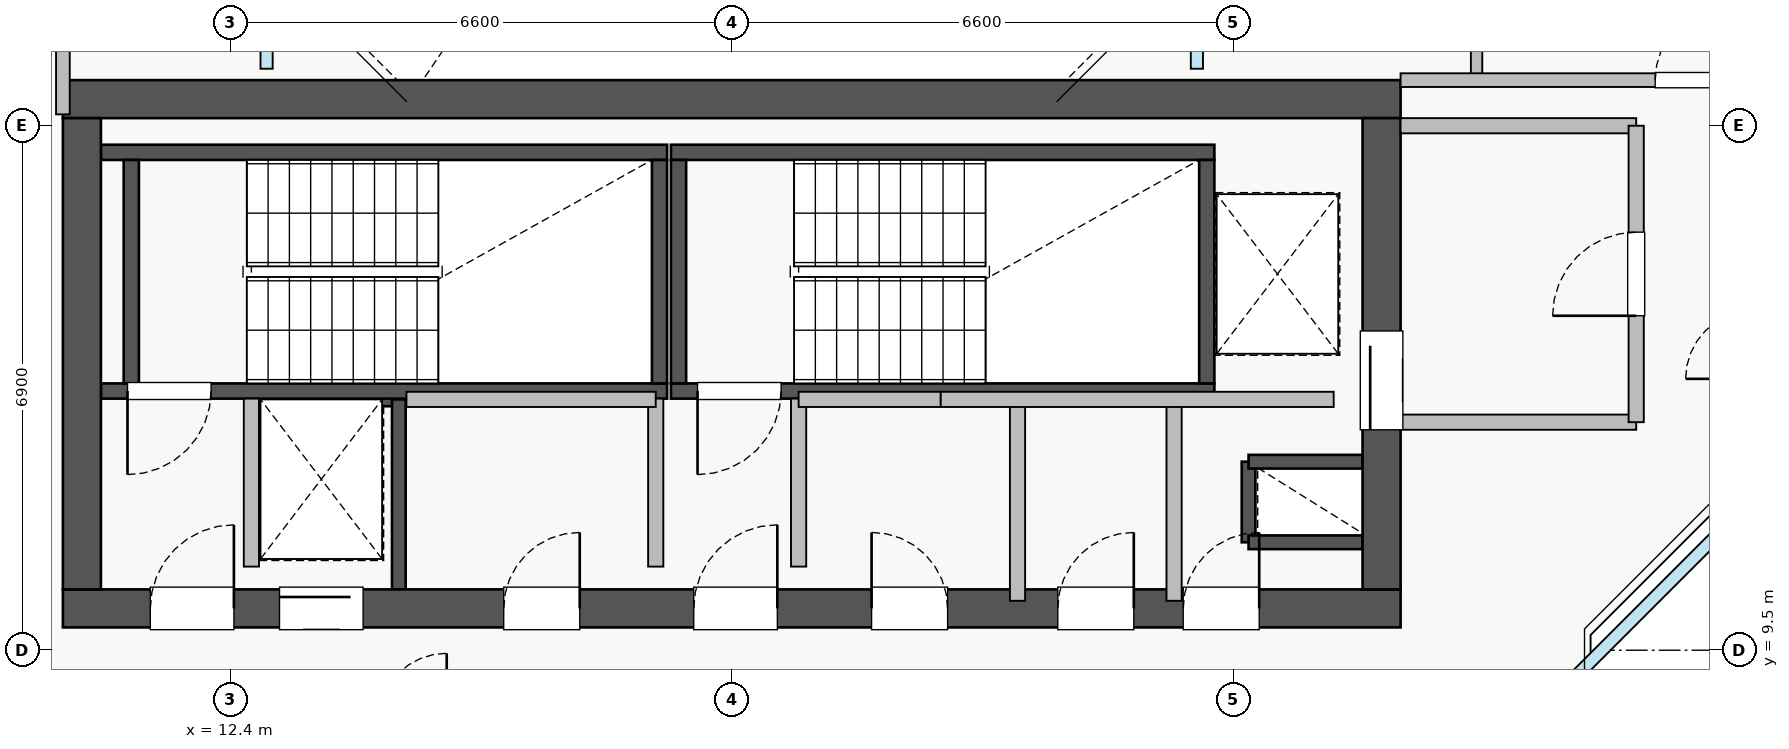
"""IFC4 building model, lengths in metres.
Left out: names, types, materials, properties, quantities, classifications, styles, units other than length and angle.
Written with IfcOpenShell. Run it as: python <this file> out.ifc"""

import sys

from ifc_helpers import new_model, si_unit, direction, frame, frame_2d, origin, place, context, subcontext, project, spatial, rectangle, extrude, source, transform, mapped, element, fill, save


model = new_model("IFC4")
c1 = context("Model", 3, precision=1e-05, world=origin(), true_north=direction((0.0, 1.0)))
c2 = subcontext(c1, "Body", "Model", "MODEL_VIEW")
j1 = project(units=[si_unit("LENGTHUNIT", "METRE"), si_unit("PLANEANGLEUNIT", "RADIAN")], contexts=[c1])
p1 = place(None, origin())
s1 = spatial("IfcSite", under=j1, at=p1, CompositionType="ELEMENT")
p2 = place(p1, origin())
s2 = spatial("IfcBuilding", under=s1, at=p2, CompositionType="ELEMENT")
p3 = place(p2, frame((0.0, 0.0, 240.5)))
s3 = spatial("IfcBuildingStorey", under=s2, at=p3, CompositionType="ELEMENT", Elevation=240.5)
p4 = place(p3, frame((12.68, 12.8, 0.0), z_axis=(0.0, 0.0, 1.0), x_axis=(1.0, 0.0, 0.0)))
e1 = element("IfcWall", 1, at=p4, inside=s3, PredefinedType="SHEAR", context=c2, shape_type="SweptSolid", body=[
    extrude(rectangle(XDim=1.94, YDim=0.18, at=frame_2d((0.97, 0.0))), origin(), (0.0, 0.0, 1.0), 3.07),
])
p5 = place(p3, frame((14.62, 10.3, 0.0), z_axis=(0.0, 0.0, 1.0), x_axis=(0.0, 1.0, 0.0)))
e2 = element("IfcWall", 2, at=p5, inside=s3, PredefinedType="SHEAR", context=c2, shape_type="SweptSolid", body=[
    extrude(rectangle(XDim=2.5, YDim=0.18, at=frame_2d((1.25, 0.0))), origin(), (0.0, 0.0, 1.0), 3.07),
])
p6 = place(p3, frame((25.8, 10.92, 0.0), z_axis=(0.0, 0.0, 1.0), x_axis=(0.0, 1.0, 0.0)))
e3 = element("IfcWall", 3, at=p6, inside=s3, PredefinedType="SHEAR", context=c2, shape_type="SweptSolid", body=[
    extrude(rectangle(XDim=1.06, YDim=0.18, at=frame_2d((0.53, 0.0))), origin(), (0.0, 0.0, 1.0), 3.07),
])
for number, where, z_axis, x_axis in (
    (4, (25.8, 11.98, 0.0), (0.0, 0.0, 1.0), (1.0, 0.0, 0.0)),
    (5, (25.8, 10.92, 0.0), (0.0, 0.0, 1.0), (1.0, 0.0, 0.0)),
):
    element("IfcWall", number, at=place(p3, frame(where, z_axis=z_axis, x_axis=x_axis)), inside=s3, PredefinedType="SHEAR", context=c2, shape_type="SweptSolid", body=[
        extrude(rectangle(XDim=1.5, YDim=0.18, at=frame_2d((0.75, 0.0))), origin(), (0.0, 0.0, 1.0), 3.07),
    ])
p7 = place(p3, frame((10.7, 12.91, 0.0), z_axis=(0.0, 0.0, 1.0), x_axis=(1.0, 0.0, 0.0)))
e6 = element("IfcWall", 6, at=p7, inside=s3, PredefinedType="SHEAR", context=c2, shape_type="SweptSolid", body=[
    extrude(rectangle(XDim=7.45, YDim=0.2, at=frame_2d((3.725, 0.0))), origin(), (0.0, 0.0, 1.0), 3.25),
])
p8 = place(p7, frame((0.35, 0.0, 0.0)))
e7 = element("IfcOpeningElement", 7, at=p8, cuts=e6, PredefinedType="OPENING", context=c2, shape_type="SweptSolid", body=[
    extrude(rectangle(XDim=1.1, YDim=2.05, at=frame_2d((0.55, 1.025))), frame((0.0, 0.11, 0.0), z_axis=(0.0, -1.0, 0.0), x_axis=(1.0, 0.0, 0.0)), (0.0, 0.0, 1.0), 0.22),
])
p9 = place(p3, frame((10.7, 16.05, 0.0), z_axis=(0.0, 0.0, 1.0), x_axis=(1.0, 0.0, 0.0)))
e8 = element("IfcWall", 8, at=p9, inside=s3, PredefinedType="SHEAR", context=c2, shape_type="SweptSolid", body=[
    extrude(rectangle(XDim=7.45, YDim=0.2, at=frame_2d((3.725, 0.0))), origin(), (0.0, 0.0, 1.0), 3.25),
])
for number, where, z_axis, x_axis in (
    (9, (11.1, 13.01, 0.0), (0.0, 0.0, 1.0), (0.0, 1.0, 0.0)),
    (10, (18.05, 13.01, 0.0), (0.0, 0.0, 1.0), (0.0, 1.0, 0.0)),
):
    element("IfcWall", number, at=place(p3, frame(where, z_axis=z_axis, x_axis=x_axis)), inside=s3, PredefinedType="SHEAR", context=c2, shape_type="SweptSolid", body=[
        extrude(rectangle(XDim=2.94, YDim=0.2, at=frame_2d((1.47, 0.0))), origin(), (0.0, 0.0, 1.0), 3.25),
    ])
p10 = place(p3, frame((18.2, 12.91, 0.0), z_axis=(0.0, 0.0, 1.0), x_axis=(1.0, 0.0, 0.0)))
e11 = element("IfcWall", 11, at=p10, inside=s3, PredefinedType="SHEAR", context=c2, shape_type="SweptSolid", body=[
    extrude(rectangle(XDim=7.15, YDim=0.2, at=frame_2d((3.575, 0.0))), origin(), (0.0, 0.0, 1.0), 3.25),
])
p11 = place(p10, frame((0.35, 0.0, 0.0)))
e12 = element("IfcOpeningElement", 12, at=p11, cuts=e11, PredefinedType="OPENING", context=c2, shape_type="SweptSolid", body=[
    extrude(rectangle(XDim=1.1, YDim=2.05, at=frame_2d((0.55, 1.025))), frame((0.0, 0.11, 0.0), z_axis=(0.0, -1.0, 0.0), x_axis=(1.0, 0.0, 0.0)), (0.0, 0.0, 1.0), 0.22),
])
p12 = place(p3, frame((18.2, 16.05, 0.0), z_axis=(0.0, 0.0, 1.0), x_axis=(1.0, 0.0, 0.0)))
e13 = element("IfcWall", 13, at=p12, inside=s3, PredefinedType="SHEAR", context=c2, shape_type="SweptSolid", body=[
    extrude(rectangle(XDim=7.15, YDim=0.2, at=frame_2d((3.575, 0.0))), origin(), (0.0, 0.0, 1.0), 3.25),
])
for number, where, z_axis, x_axis in (
    (14, (18.3, 13.01, 0.0), (0.0, 0.0, 1.0), (0.0, 1.0, 0.0)),
    (15, (25.25, 13.01, 0.0), (0.0, 0.0, 1.0), (0.0, 1.0, 0.0)),
):
    element("IfcWall", number, at=place(p3, frame(where, z_axis=z_axis, x_axis=x_axis)), inside=s3, PredefinedType="SHEAR", context=c2, shape_type="SweptSolid", body=[
        extrude(rectangle(XDim=2.94, YDim=0.2, at=frame_2d((1.47, 0.0))), origin(), (0.0, 0.0, 1.0), 3.25),
    ])
p13 = place(p3, frame((10.2, 10.05, 0.0), z_axis=(0.0, 0.0, 1.0), x_axis=(1.0, 0.0, 0.0)))
e16 = element("IfcWall", 16, at=p13, inside=s3, PredefinedType="SHEAR", context=c2, shape_type="SweptSolid", body=[
    extrude(rectangle(XDim=17.6, YDim=0.5, at=frame_2d((8.8, 0.0))), origin(), (0.0, 0.0, 1.0), 3.25),
])
p14 = place(p13, frame((1.15, 0.0, 0.0)))
e17 = element("IfcOpeningElement", 17, at=p14, cuts=e16, PredefinedType="OPENING", context=c2, shape_type="SweptSolid", body=[
    extrude(rectangle(XDim=1.1, YDim=2.05, at=frame_2d((0.55, 1.025))), frame((0.0, 0.26, 0.0), z_axis=(0.0, -1.0, 0.0), x_axis=(1.0, 0.0, 0.0)), (0.0, 0.0, 1.0), 0.52),
])
p15 = place(p13, frame((8.3, 0.0, 0.0)))
e18 = element("IfcOpeningElement", 18, at=p15, cuts=e16, PredefinedType="OPENING", context=c2, shape_type="SweptSolid", body=[
    extrude(rectangle(XDim=1.1, YDim=2.05, at=frame_2d((0.55, 1.025))), frame((0.0, 0.26, 0.0), z_axis=(0.0, -1.0, 0.0), x_axis=(1.0, 0.0, 0.0)), (0.0, 0.0, 1.0), 0.52),
])
p16 = place(p13, frame((2.85, 0.0, 0.0)))
e19 = element("IfcOpeningElement", 19, at=p16, cuts=e16, PredefinedType="OPENING", context=c2, shape_type="SweptSolid", body=[
    extrude(rectangle(XDim=1.1, YDim=2.05, at=frame_2d((0.55, 1.025))), frame((0.0, 0.26, 0.0), z_axis=(0.0, -1.0, 0.0), x_axis=(1.0, 0.0, 0.0)), (0.0, 0.0, 1.0), 0.52),
])
p17 = place(p13, frame((5.8, 0.0, 0.0)))
e20 = element("IfcOpeningElement", 20, at=p17, cuts=e16, PredefinedType="OPENING", context=c2, shape_type="SweptSolid", body=[
    extrude(rectangle(XDim=1.0, YDim=2.05, at=frame_2d((0.5, 1.025))), frame((0.0, 0.26, 0.0), z_axis=(0.0, -1.0, 0.0), x_axis=(1.0, 0.0, 0.0)), (0.0, 0.0, 1.0), 0.52),
])
p18 = place(p13, frame((14.74, 0.0, 0.0)))
e21 = element("IfcOpeningElement", 21, at=p18, cuts=e16, PredefinedType="OPENING", context=c2, shape_type="SweptSolid", body=[
    extrude(rectangle(XDim=1.0, YDim=2.05, at=frame_2d((0.5, 1.025))), frame((0.0, 0.26, 0.0), z_axis=(0.0, -1.0, 0.0), x_axis=(1.0, 0.0, 0.0)), (0.0, 0.0, 1.0), 0.52),
])
p19 = place(p13, frame((10.64, 0.0, 0.0)))
e22 = element("IfcOpeningElement", 22, at=p19, cuts=e16, PredefinedType="OPENING", context=c2, shape_type="SweptSolid", body=[
    extrude(rectangle(XDim=1.0, YDim=2.05, at=frame_2d((0.5, 1.025))), frame((0.0, 0.26, 0.0), z_axis=(0.0, -1.0, 0.0), x_axis=(1.0, 0.0, 0.0)), (0.0, 0.0, 1.0), 0.52),
])
p20 = place(p13, frame((13.09, 0.0, 0.0)))
e23 = element("IfcOpeningElement", 23, at=p20, cuts=e16, PredefinedType="OPENING", context=c2, shape_type="SweptSolid", body=[
    extrude(rectangle(XDim=1.0, YDim=2.05, at=frame_2d((0.5, 1.025))), frame((0.0, 0.26, 0.0), z_axis=(0.0, -1.0, 0.0), x_axis=(1.0, 0.0, 0.0)), (0.0, 0.0, 1.0), 0.52),
])
p21 = place(p3, frame((10.2, 16.75, 0.0), z_axis=(0.0, 0.0, 1.0), x_axis=(1.0, 0.0, 0.0)))
e24 = element("IfcWall", 24, at=p21, inside=s3, PredefinedType="SHEAR", context=c2, shape_type="SweptSolid", body=[
    extrude(rectangle(XDim=17.6, YDim=0.5, at=frame_2d((8.8, 0.0))), origin(), (0.0, 0.0, 1.0), 3.25),
])
p22 = place(p3, frame((10.45, 10.3, 0.0), z_axis=(0.0, 0.0, 1.0), x_axis=(0.0, 1.0, 0.0)))
e25 = element("IfcWall", 25, at=p22, inside=s3, PredefinedType="SHEAR", context=c2, shape_type="SweptSolid", body=[
    extrude(rectangle(XDim=6.2, YDim=0.5, at=frame_2d((3.1, 0.0))), origin(), (0.0, 0.0, 1.0), 3.25),
])
p23 = place(p3, frame((27.55, 10.3, 0.0), z_axis=(0.0, 0.0, 1.0), x_axis=(0.0, 1.0, 0.0)))
e26 = element("IfcWall", 26, at=p23, inside=s3, PredefinedType="SHEAR", context=c2, shape_type="SweptSolid", body=[
    extrude(rectangle(XDim=6.2, YDim=0.5, at=frame_2d((3.1, 0.0))), origin(), (0.0, 0.0, 1.0), 3.25),
])
p24 = place(p23, frame((2.1, 0.0, 0.0)))
e27 = element("IfcOpeningElement", 27, at=p24, cuts=e26, PredefinedType="OPENING", context=c2, shape_type="SweptSolid", body=[
    extrude(rectangle(XDim=1.3, YDim=2.05, at=frame_2d((0.65, 1.025))), frame((0.0, 0.26, 0.0), z_axis=(0.0, -1.0, 0.0), x_axis=(1.0, 0.0, 0.0)), (0.0, 0.0, 1.0), 0.52),
])
for number, where, z_axis, x_axis in (
    (28, (27.8, 16.4, 0.0), (0.0, 0.0, 1.0), (1.0, 0.0, 0.0)),
    (29, (27.8, 12.5, 0.0), (0.0, 0.0, 1.0), (1.0, 0.0, 0.0)),
):
    element("IfcWall", number, at=place(p3, frame(where, z_axis=z_axis, x_axis=x_axis)), inside=s3, PredefinedType="PARTITIONING", context=c2, shape_type="SweptSolid", body=[
        extrude(rectangle(XDim=3.1, YDim=0.2, at=frame_2d((1.55, 0.0))), origin(), (0.0, 0.0, 1.0), 3.07),
    ])
p25 = place(p3, frame((30.9, 12.5, 0.0), z_axis=(0.0, 0.0, 1.0), x_axis=(0.0, 1.0, 0.0)))
e30 = element("IfcWall", 30, at=p25, inside=s3, PredefinedType="PARTITIONING", context=c2, shape_type="SweptSolid", body=[
    extrude(rectangle(XDim=3.9, YDim=0.2, at=frame_2d((1.95, 0.0))), origin(), (0.0, 0.0, 1.0), 2.821),
])
p26 = place(p25, frame((1.4, 0.0, 0.0)))
e31 = element("IfcOpeningElement", 31, at=p26, cuts=e30, PredefinedType="OPENING", context=c2, shape_type="SweptSolid", body=[
    extrude(rectangle(XDim=1.1, YDim=2.05, at=frame_2d((0.55, 1.025))), frame((0.0, 0.11, 0.0), z_axis=(0.0, -1.0, 0.0), x_axis=(1.0, 0.0, 0.0)), (0.0, 0.0, 1.0), 0.22),
])
for number, where, z_axis, x_axis in (
    (32, (12.68, 10.6, 0.0), (0.0, 0.0, 1.0), (0.0, 1.0, 0.0)),
    (33, (18.0, 10.6, 0.0), (0.0, 0.0, 1.0), (0.0, 1.0, 0.0)),
    (34, (19.88, 10.6, 0.0), (0.0, 0.0, 1.0), (0.0, 1.0, 0.0)),
):
    element("IfcWall", number, at=place(p3, frame(where, z_axis=z_axis, x_axis=x_axis)), inside=s3, PredefinedType="PARTITIONING", context=c2, shape_type="SweptSolid", body=[
        extrude(rectangle(XDim=2.21, YDim=0.2, at=frame_2d((1.105, 0.0))), origin(), (0.0, 0.0, 1.0), 3.07),
    ])
p27 = place(p3, frame((14.72, 12.8, 0.0), z_axis=(0.0, 0.0, 1.0), x_axis=(1.0, 0.0, 0.0)))
e35 = element("IfcWall", 35, at=p27, inside=s3, PredefinedType="PARTITIONING", context=c2, shape_type="SweptSolid", body=[
    extrude(rectangle(XDim=3.28, YDim=0.2, at=frame_2d((1.64, 0.0))), origin(), (0.0, 0.0, 1.0), 3.07),
])
p28 = place(p3, frame((24.82, 10.15, 0.0), z_axis=(0.0, 0.0, 1.0), x_axis=(0.0, 1.0, 0.0)))
e36 = element("IfcWall", 36, at=p28, inside=s3, PredefinedType="PARTITIONING", context=c2, shape_type="SweptSolid", body=[
    extrude(rectangle(XDim=2.65, YDim=0.2, at=frame_2d((1.325, 0.0))), origin(), (0.0, 0.0, 1.0), 3.07),
])
p29 = place(p3, frame((19.88, 12.8, 0.0), z_axis=(0.0, 0.0, 1.0), x_axis=(1.0, 0.0, 0.0)))
e37 = element("IfcWall", 37, at=p29, inside=s3, PredefinedType="PARTITIONING", context=c2, shape_type="SweptSolid", body=[
    extrude(rectangle(XDim=1.87, YDim=0.2, at=frame_2d((0.935, 0.0))), origin(), (0.0, 0.0, 1.0), 3.07),
])
p30 = place(p3, frame((22.76, 10.15, 0.0), z_axis=(0.0, 0.0, 1.0), x_axis=(0.0, 1.0, 0.0)))
e38 = element("IfcWall", 38, at=p30, inside=s3, PredefinedType="PARTITIONING", context=c2, shape_type="SweptSolid", body=[
    extrude(rectangle(XDim=2.65, YDim=0.2, at=frame_2d((1.325, 0.0))), origin(), (0.0, 0.0, 1.0), 3.07),
])
p31 = place(p3, frame((21.75, 12.8, 0.0), z_axis=(0.0, 0.0, 1.0), x_axis=(1.0, 0.0, 0.0)))
e39 = element("IfcWall", 39, at=p31, inside=s3, PredefinedType="PARTITIONING", context=c2, shape_type="SweptSolid", body=[
    extrude(rectangle(XDim=5.17, YDim=0.2, at=frame_2d((2.585, 0.0))), origin(), (0.0, 0.0, 1.0), 3.07),
])
p32 = place(p3, frame((10.2, 16.55, 0.0), z_axis=(0.0, 0.0, 1.0), x_axis=(0.0, 1.0, 0.0)))
e40 = element("IfcWall", 40, at=p32, inside=s3, PredefinedType="PARTITIONING", context=c2, shape_type="SweptSolid", body=[
    extrude(rectangle(XDim=12.9, YDim=0.18, at=frame_2d((6.45, 0.0))), origin(), (0.0, 0.0, 1.0), 3.07),
])
p33 = place(p32, frame((2.025, 0.0, 0.0)))
e41 = element("IfcOpeningElement", 41, at=p33, cuts=e40, PredefinedType="OPENING", context=c2, shape_type="SweptSolid", body=[
    extrude(rectangle(XDim=0.85, YDim=2.05, at=frame_2d((0.425, 1.025))), frame((0.0, 0.1, 0.0), z_axis=(0.0, -1.0, 0.0), x_axis=(1.0, 0.0, 0.0)), (0.0, 0.0, 1.0), 0.2),
])
p34 = place(p32, frame((8.0, 0.0, 0.0)))
e42 = element("IfcOpeningElement", 42, at=p34, cuts=e40, PredefinedType="OPENING", context=c2, shape_type="SweptSolid", body=[
    extrude(rectangle(XDim=0.9, YDim=2.05, at=frame_2d((0.45, 1.025))), frame((0.0, 0.1, 0.0), z_axis=(0.0, -1.0, 0.0), x_axis=(1.0, 0.0, 0.0)), (0.0, 0.0, 1.0), 0.2),
])
p35 = place(p3, frame((28.8, 17.0, 0.0), z_axis=(0.0, 0.0, 1.0), x_axis=(0.0, 1.0, 0.0)))
e43 = element("IfcWall", 43, at=p35, inside=s3, PredefinedType="PARTITIONING", context=c2, shape_type="SweptSolid", body=[
    extrude(rectangle(XDim=6.0, YDim=0.15, at=frame_2d((3.0, 0.0))), origin(), (0.0, 0.0, 1.0), 3.07),
])
p36 = place(p35, frame((2.2, 0.0, 0.0)))
e44 = element("IfcOpeningElement", 44, at=p36, cuts=e43, PredefinedType="OPENING", context=c2, shape_type="SweptSolid", body=[
    extrude(rectangle(XDim=0.9, YDim=2.05, at=frame_2d((0.45, 1.025))), frame((0.0, 0.085, 0.0), z_axis=(0.0, -1.0, 0.0), x_axis=(1.0, 0.0, 0.0)), (0.0, 0.0, 1.0), 0.17),
])
p37 = place(p3, frame((27.8, 17.0, 0.0), z_axis=(0.0, 0.0, 1.0), x_axis=(1.0, 0.0, 0.0)))
e45 = element("IfcWall", 45, at=p37, inside=s3, PredefinedType="PARTITIONING", context=c2, shape_type="SweptSolid", body=[
    extrude(rectangle(XDim=6.65, YDim=0.18, at=frame_2d((3.325, 0.0))), origin(), (0.0, 0.0, 1.0), 3.07),
])
p38 = place(p37, frame((3.35, 0.0, 0.0)))
e46 = element("IfcOpeningElement", 46, at=p38, cuts=e45, PredefinedType="OPENING", context=c2, shape_type="SweptSolid", body=[
    extrude(rectangle(XDim=1.0, YDim=2.05, at=frame_2d((0.5, 1.025))), frame((0.0, 0.1, 0.0), z_axis=(0.0, -1.0, 0.0), x_axis=(1.0, 0.0, 0.0)), (0.0, 0.0, 1.0), 0.2),
])
m1 = source(origin(), c2, "Body", "SweptSolid", [
    extrude(rectangle(XDim=1.3, YDim=2.05, at=frame_2d((0.65, 1.025))), frame((0.0, 0.025, 0.0), z_axis=(0.0, -1.0, 0.0), x_axis=(1.0, 0.0, 0.0)), (0.0, 0.0, 1.0), 0.05),
])
p39 = place(p24, origin())
e47 = element("IfcDoor", 47, at=p39, inside=s3, OperationType="SLIDING_TO_RIGHT", PredefinedType="DOOR", context=c2, shape_type="MappedRepresentation", body=[
    mapped(m1, transform((0.0, 0.0, 0.0), x_axis=(1.0, 0.0, 0.0), y_axis=(0.0, 1.0, 0.0), z_axis=(0.0, 0.0, 1.0), scale=1.0)),
])
fill(e27, e47)
m2 = source(origin(), c2, "Body", "SweptSolid", [
    extrude(rectangle(XDim=1.1, YDim=2.05, at=frame_2d((0.55, 1.025))), frame((0.0, 0.025, 0.0), z_axis=(0.0, -1.0, 0.0), x_axis=(1.0, 0.0, 0.0)), (0.0, 0.0, 1.0), 0.05),
])
p40 = place(p14, origin())
e48 = element("IfcDoor", 48, at=p40, inside=s3, OperationType="SINGLE_SWING_RIGHT", PredefinedType="DOOR", context=c2, shape_type="MappedRepresentation", body=[
    mapped(m2, transform((0.0, 0.0, 0.0), x_axis=(1.0, 0.0, 0.0), y_axis=(0.0, 1.0, 0.0), z_axis=(0.0, 0.0, 1.0), scale=1.0)),
])
fill(e17, e48)
p41 = place(p8, frame((1.1, 0.0, 0.0), z_axis=(0.0, 0.0, 1.0), x_axis=(-1.0, 0.0, 0.0)))
e49 = element("IfcDoor", 49, at=p41, inside=s3, OperationType="SINGLE_SWING_LEFT", PredefinedType="DOOR", context=c2, shape_type="MappedRepresentation", body=[
    mapped(m2, transform((0.0, 0.0, 0.0), x_axis=(1.0, 0.0, 0.0), y_axis=(0.0, 1.0, 0.0), z_axis=(0.0, 0.0, 1.0), scale=1.0)),
])
fill(e7, e49)
p42 = place(p15, origin())
e50 = element("IfcDoor", 50, at=p42, inside=s3, OperationType="SINGLE_SWING_RIGHT", PredefinedType="DOOR", context=c2, shape_type="MappedRepresentation", body=[
    mapped(m2, transform((0.0, 0.0, 0.0), x_axis=(1.0, 0.0, 0.0), y_axis=(0.0, 1.0, 0.0), z_axis=(0.0, 0.0, 1.0), scale=1.0)),
])
fill(e18, e50)
p43 = place(p11, frame((1.1, 0.0, 0.0), z_axis=(0.0, 0.0, 1.0), x_axis=(-1.0, 0.0, 0.0)))
e51 = element("IfcDoor", 51, at=p43, inside=s3, OperationType="SINGLE_SWING_LEFT", PredefinedType="DOOR", context=c2, shape_type="MappedRepresentation", body=[
    mapped(m2, transform((0.0, 0.0, 0.0), x_axis=(1.0, 0.0, 0.0), y_axis=(0.0, 1.0, 0.0), z_axis=(0.0, 0.0, 1.0), scale=1.0)),
])
fill(e12, e51)
p44 = place(p16, origin())
e52 = element("IfcDoor", 52, at=p44, inside=s3, OperationType="SLIDING_TO_RIGHT", PredefinedType="DOOR", context=c2, shape_type="MappedRepresentation", body=[
    mapped(m2, transform((0.0, 0.0, 0.0), x_axis=(1.0, 0.0, 0.0), y_axis=(0.0, 1.0, 0.0), z_axis=(0.0, 0.0, 1.0), scale=1.0)),
])
fill(e19, e52)
m3 = source(origin(), c2, "Body", "SweptSolid", [
    extrude(rectangle(XDim=1.0, YDim=2.05, at=frame_2d((0.5, 1.025))), frame((0.0, 0.025, 0.0), z_axis=(0.0, -1.0, 0.0), x_axis=(1.0, 0.0, 0.0)), (0.0, 0.0, 1.0), 0.05),
])
p45 = place(p17, origin())
e53 = element("IfcDoor", 53, at=p45, inside=s3, OperationType="SINGLE_SWING_RIGHT", PredefinedType="DOOR", context=c2, shape_type="MappedRepresentation", body=[
    mapped(m3, transform((0.0, 0.0, 0.0), x_axis=(1.0, 0.0, 0.0), y_axis=(0.0, 1.0, 0.0), z_axis=(0.0, 0.0, 1.0), scale=1.0)),
])
fill(e20, e53)
p46 = place(p18, origin())
e54 = element("IfcDoor", 54, at=p46, inside=s3, OperationType="SINGLE_SWING_RIGHT", PredefinedType="DOOR", context=c2, shape_type="MappedRepresentation", body=[
    mapped(m3, transform((0.0, 0.0, 0.0), x_axis=(1.0, 0.0, 0.0), y_axis=(0.0, 1.0, 0.0), z_axis=(0.0, 0.0, 1.0), scale=1.0)),
])
fill(e21, e54)
p47 = place(p19, origin())
e55 = element("IfcDoor", 55, at=p47, inside=s3, OperationType="SINGLE_SWING_LEFT", PredefinedType="DOOR", context=c2, shape_type="MappedRepresentation", body=[
    mapped(m3, transform((0.0, 0.0, 0.0), x_axis=(1.0, 0.0, 0.0), y_axis=(0.0, 1.0, 0.0), z_axis=(0.0, 0.0, 1.0), scale=1.0)),
])
fill(e22, e55)
p48 = place(p20, origin())
e56 = element("IfcDoor", 56, at=p48, inside=s3, OperationType="SINGLE_SWING_RIGHT", PredefinedType="DOOR", context=c2, shape_type="MappedRepresentation", body=[
    mapped(m3, transform((0.0, 0.0, 0.0), x_axis=(1.0, 0.0, 0.0), y_axis=(0.0, 1.0, 0.0), z_axis=(0.0, 0.0, 1.0), scale=1.0)),
])
fill(e23, e56)
p49 = place(p26, origin())
e57 = element("IfcDoor", 57, at=p49, inside=s3, OperationType="SINGLE_SWING_LEFT", PredefinedType="DOOR", context=c2, shape_type="MappedRepresentation", body=[
    mapped(m2, transform((0.0, 0.0, 0.0), x_axis=(1.0, 0.0, 0.0), y_axis=(0.0, 1.0, 0.0), z_axis=(0.0, 0.0, 1.0), scale=1.0)),
])
fill(e31, e57)
p50 = place(p38, origin())
e58 = element("IfcDoor", 58, at=p50, inside=s3, OperationType="SINGLE_SWING_RIGHT", PredefinedType="DOOR", context=c2, shape_type="MappedRepresentation", body=[
    mapped(m3, transform((0.0, 0.0, 0.0), x_axis=(1.0, 0.0, 0.0), y_axis=(0.0, 1.0, 0.0), z_axis=(0.0, 0.0, 1.0), scale=1.0)),
])
fill(e46, e58)
save(model, sys.argv[1])
